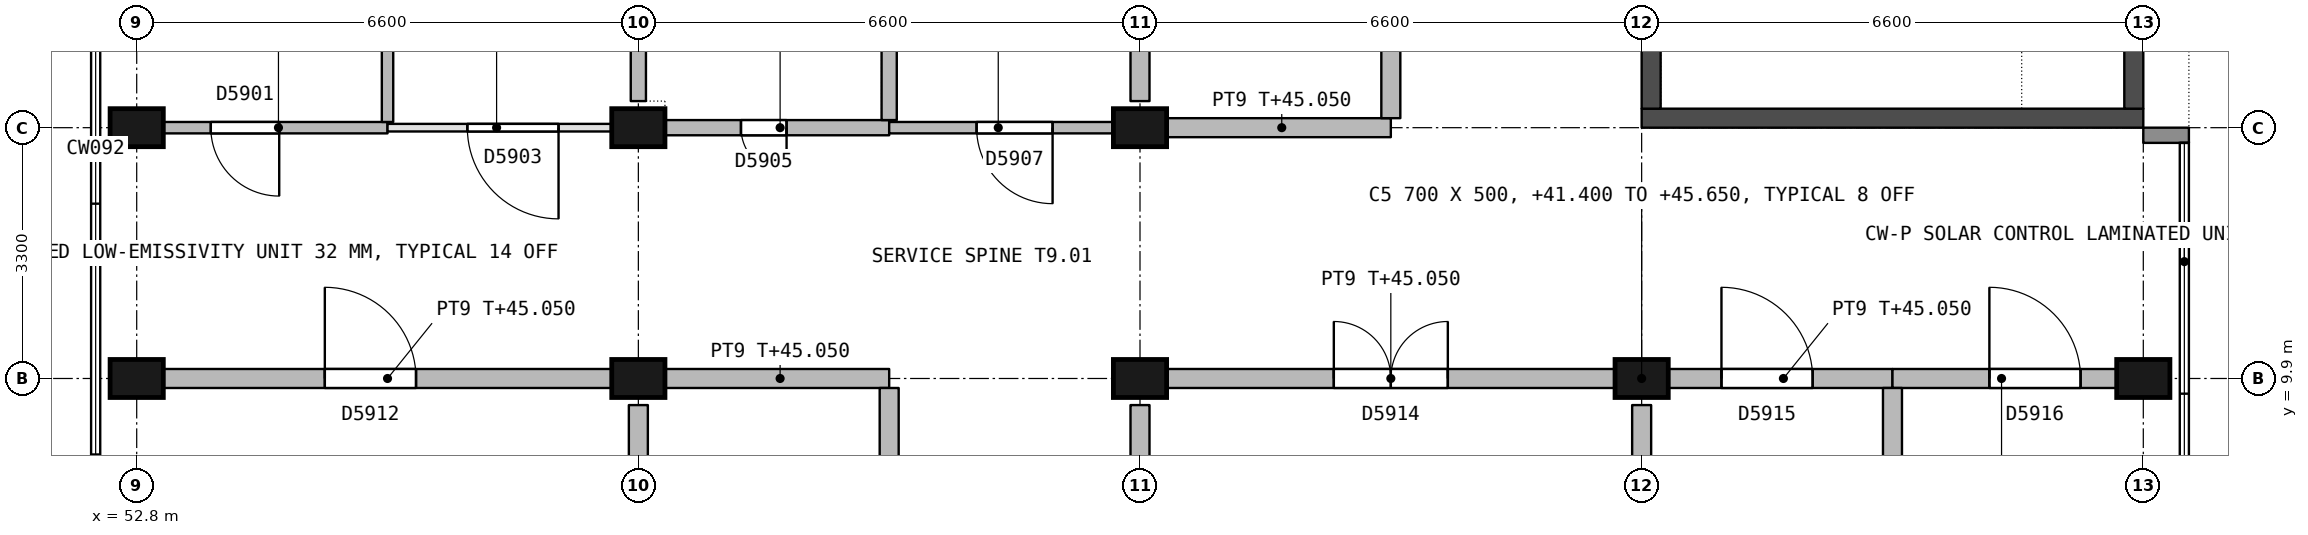
"""IFC4 building model, lengths in metres.
Left out: names, types, materials, properties, quantities, classifications, styles, units other than length and angle.
Written with IfcOpenShell. Run it as: python <this file> out.ifc"""

import sys

from ifc_helpers import new_model, si_unit, direction, frame, frame_2d, origin, origin_2d, place, context, subcontext, project, spatial, rectangle, extrude, element, fill, save


model = new_model("IFC4")
c1 = context("Model", 3, precision=1e-05, world=origin(), true_north=direction((0.0, 1.0)))
c2 = subcontext(c1, "Body", "Model", "MODEL_VIEW")
j1 = project(units=[si_unit("LENGTHUNIT", "METRE"), si_unit("PLANEANGLEUNIT", "RADIAN")], contexts=[c1])
p1 = place(None, origin())
s1 = spatial("IfcSite", under=j1, at=p1, CompositionType="ELEMENT")
p2 = place(p1, origin())
s2 = spatial("IfcBuilding", under=s1, at=p2, CompositionType="ELEMENT")
p3 = place(p2, frame((0.0, 0.0, 41.4)))
s3 = spatial("IfcBuildingStorey", under=s2, at=p3, CompositionType="ELEMENT", Elevation=41.4)
for number, where, z_axis, x_axis in (
    (1, (52.8, 9.9, 0.0), (0.0, 0.0, 1.0), (1.0, 0.0, 0.0)),
    (2, (52.8, 13.2, 0.0), (0.0, 0.0, 1.0), (1.0, 0.0, 0.0)),
    (3, (59.4, 9.9, 0.0), (0.0, 0.0, 1.0), (1.0, 0.0, 0.0)),
    (4, (59.4, 13.2, 0.0), (0.0, 0.0, 1.0), (1.0, 0.0, 0.0)),
    (5, (66.0, 9.9, 0.0), (0.0, 0.0, 1.0), (1.0, 0.0, 0.0)),
    (6, (66.0, 13.2, 0.0), (0.0, 0.0, 1.0), (1.0, 0.0, 0.0)),
    (7, (72.6, 9.9, 0.0), (0.0, 0.0, 1.0), (1.0, 0.0, 0.0)),
    (8, (79.2, 9.9, 0.0), (0.0, 0.0, 1.0), (1.0, 0.0, 0.0)),
):
    element("IfcColumn", number, at=place(p3, frame(where, z_axis=z_axis, x_axis=x_axis)), inside=s3, PredefinedType="COLUMN", context=c2, shape_type="SweptSolid", body=[
        extrude(rectangle(XDim=0.7, YDim=0.5, at=origin_2d()), origin(), (0.0, 0.0, 1.0), 4.25),
    ])
p4 = place(p3, frame((72.6, 13.325, 0.0), z_axis=(0.0, 0.0, 1.0), x_axis=(1.0, 0.0, 0.0)))
e9 = element("IfcWall", 9, at=p4, inside=s3, PredefinedType="SHEAR", context=c2, shape_type="SweptSolid", body=[
    extrude(rectangle(XDim=6.6, YDim=0.25, at=frame_2d((3.3, 0.0))), origin(), (0.0, 0.0, 1.0), 4.25),
])
p5 = place(p3, frame((72.725, 13.45, 0.0), z_axis=(0.0, 0.0, 1.0), x_axis=(0.0, 1.0, 0.0)))
e10 = element("IfcWall", 10, at=p5, inside=s3, PredefinedType="SHEAR", context=c2, shape_type="SweptSolid", body=[
    extrude(rectangle(XDim=9.4, YDim=0.25, at=frame_2d((4.7, 0.0))), origin(), (0.0, 0.0, 1.0), 4.25),
])
p6 = place(p5, frame((4.125, 0.0, 0.0)))
e11 = element("IfcOpeningElement", 11, at=p6, cuts=e10, PredefinedType="OPENING", context=c2, shape_type="SweptSolid", body=[
    extrude(rectangle(XDim=1.2, YDim=2.1, at=frame_2d((0.6, 1.05))), frame((0.0, 0.135, 0.0), z_axis=(0.0, -1.0, 0.0), x_axis=(1.0, 0.0, 0.0)), (0.0, 0.0, 1.0), 0.27),
])
p7 = place(p3, frame((79.075, 13.45, 0.0), z_axis=(0.0, 0.0, 1.0), x_axis=(0.0, 1.0, 0.0)))
e12 = element("IfcWall", 12, at=p7, inside=s3, PredefinedType="SHEAR", context=c2, shape_type="SweptSolid", body=[
    extrude(rectangle(XDim=9.4, YDim=0.25, at=frame_2d((4.7, 0.0))), origin(), (0.0, 0.0, 1.0), 4.25),
])
p8 = place(p7, frame((0.95, 0.0, 0.7)))
e13 = element("IfcOpeningElement", 13, at=p8, cuts=e12, PredefinedType="OPENING", context=c2, shape_type="SweptSolid", body=[
    extrude(rectangle(XDim=1.2, YDim=1.8, at=frame_2d((0.6, 0.9))), frame((0.0, 0.135, 0.0), z_axis=(0.0, -1.0, 0.0), x_axis=(1.0, 0.0, 0.0)), (0.0, 0.0, 1.0), 0.27),
])
p9 = place(p3, frame((79.2, 13.1, 0.0), z_axis=(0.0, 0.0, 1.0), x_axis=(1.0, 0.0, 0.0)))
e14 = element("IfcWall", 14, at=p9, inside=s3, PredefinedType="STANDARD", context=c2, shape_type="SweptSolid", body=[
    extrude(rectangle(XDim=0.6, YDim=0.2, at=frame_2d((0.3, 0.0))), origin(), (0.0, 0.0, 1.0), 3.65),
])
p10 = place(p3, frame((56.1, 13.2, 0.0), z_axis=(0.0, 0.0, 1.0), x_axis=(-1.0, 0.0, 0.0)))
e15 = element("IfcWall", 15, at=p10, inside=s3, PredefinedType="PARTITIONING", context=c2, shape_type="SweptSolid", body=[
    extrude(rectangle(XDim=2.95, YDim=0.15, at=frame_2d((1.475, 0.0))), origin(), (0.0, 0.0, 1.0), 3.65),
])
p11 = place(p10, frame((1.425, 0.0, 0.0)))
e16 = element("IfcOpeningElement", 16, at=p11, cuts=e15, PredefinedType="OPENING", context=c2, shape_type="SweptSolid", body=[
    extrude(rectangle(XDim=0.9, YDim=2.1, at=frame_2d((0.45, 1.05))), frame((0.0, 0.085, 0.0), z_axis=(0.0, -1.0, 0.0), x_axis=(1.0, 0.0, 0.0)), (0.0, 0.0, 1.0), 0.17),
])
p12 = place(p3, frame((56.1, 13.2, 0.0), z_axis=(0.0, 0.0, 1.0), x_axis=(1.0, 0.0, 0.0)))
e17 = element("IfcWall", 17, at=p12, inside=s3, PredefinedType="PARTITIONING", context=c2, shape_type="SweptSolid", body=[
    extrude(rectangle(XDim=2.95, YDim=0.1, at=frame_2d((1.475, 0.0))), origin(), (0.0, 0.0, 1.0), 3.65),
])
p13 = place(p12, frame((1.05, 0.0, 0.0)))
e18 = element("IfcOpeningElement", 18, at=p13, cuts=e17, PredefinedType="OPENING", context=c2, shape_type="SweptSolid", body=[
    extrude(rectangle(XDim=1.2, YDim=2.1, at=frame_2d((0.6, 1.05))), frame((0.0, 0.06, 0.0), z_axis=(0.0, -1.0, 0.0), x_axis=(1.0, 0.0, 0.0)), (0.0, 0.0, 1.0), 0.12),
])
p14 = place(p3, frame((59.75, 13.2, 0.0), z_axis=(0.0, 0.0, 1.0), x_axis=(1.0, 0.0, 0.0)))
e19 = element("IfcWall", 19, at=p14, inside=s3, PredefinedType="PARTITIONING", context=c2, shape_type="SweptSolid", body=[
    extrude(rectangle(XDim=2.95, YDim=0.2, at=frame_2d((1.475, 0.0))), origin(), (0.0, 0.0, 1.0), 3.65),
])
p15 = place(p14, frame((1.0, 0.0, 0.0)))
e20 = element("IfcOpeningElement", 20, at=p15, cuts=e19, PredefinedType="OPENING", context=c2, shape_type="SweptSolid", body=[
    extrude(rectangle(XDim=0.6, YDim=2.1, at=frame_2d((0.3, 1.05))), frame((0.0, 0.11, 0.0), z_axis=(0.0, -1.0, 0.0), x_axis=(1.0, 0.0, 0.0)), (0.0, 0.0, 1.0), 0.22),
])
p16 = place(p3, frame((62.7, 13.2, 0.0), z_axis=(0.0, 0.0, 1.0), x_axis=(1.0, 0.0, 0.0)))
e21 = element("IfcWall", 21, at=p16, inside=s3, PredefinedType="PARTITIONING", context=c2, shape_type="SweptSolid", body=[
    extrude(rectangle(XDim=2.95, YDim=0.15, at=frame_2d((1.475, 0.0))), origin(), (0.0, 0.0, 1.0), 3.65),
])
p17 = place(p16, frame((1.15, 0.0, 0.0)))
e22 = element("IfcOpeningElement", 22, at=p17, cuts=e21, PredefinedType="OPENING", context=c2, shape_type="SweptSolid", body=[
    extrude(rectangle(XDim=1.0, YDim=2.1, at=frame_2d((0.5, 1.05))), frame((0.0, 0.085, 0.0), z_axis=(0.0, -1.0, 0.0), x_axis=(1.0, 0.0, 0.0)), (0.0, 0.0, 1.0), 0.17),
])
p18 = place(p3, frame((69.3, 13.2, 0.0), z_axis=(0.0, 0.0, 1.0), x_axis=(-1.0, 0.0, 0.0)))
e23 = element("IfcWall", 23, at=p18, inside=s3, PredefinedType="PARTITIONING", context=c2, shape_type="SweptSolid", body=[
    extrude(rectangle(XDim=2.95, YDim=0.25, at=frame_2d((1.475, 0.0))), origin(), (0.0, 0.0, 1.0), 3.65),
])
p19 = place(p3, frame((53.15, 9.9, 0.0), z_axis=(0.0, 0.0, 1.0), x_axis=(1.0, 0.0, 0.0)))
e24 = element("IfcWall", 24, at=p19, inside=s3, PredefinedType="PARTITIONING", context=c2, shape_type="SweptSolid", body=[
    extrude(rectangle(XDim=5.9, YDim=0.25, at=frame_2d((2.95, 0.0))), origin(), (0.0, 0.0, 1.0), 3.65),
])
p20 = place(p19, frame((2.125, 0.0, 0.0)))
e25 = element("IfcOpeningElement", 25, at=p20, cuts=e24, PredefinedType="OPENING", context=c2, shape_type="SweptSolid", body=[
    extrude(rectangle(XDim=1.2, YDim=2.4, at=frame_2d((0.6, 1.2))), frame((0.0, 0.135, 0.0), z_axis=(0.0, -1.0, 0.0), x_axis=(1.0, 0.0, 0.0)), (0.0, 0.0, 1.0), 0.27),
])
p21 = place(p3, frame((59.75, 9.9, 0.0), z_axis=(0.0, 0.0, 1.0), x_axis=(1.0, 0.0, 0.0)))
e26 = element("IfcWall", 26, at=p21, inside=s3, PredefinedType="PARTITIONING", context=c2, shape_type="SweptSolid", body=[
    extrude(rectangle(XDim=2.95, YDim=0.25, at=frame_2d((1.475, 0.0))), origin(), (0.0, 0.0, 1.0), 3.65),
])
p22 = place(p3, frame((66.35, 9.9, 0.0), z_axis=(0.0, 0.0, 1.0), x_axis=(1.0, 0.0, 0.0)))
e27 = element("IfcWall", 27, at=p22, inside=s3, PredefinedType="PARTITIONING", context=c2, shape_type="SweptSolid", body=[
    extrude(rectangle(XDim=5.9, YDim=0.25, at=frame_2d((2.95, 0.0))), origin(), (0.0, 0.0, 1.0), 3.65),
])
p23 = place(p22, frame((2.2, 0.0, 0.0)))
e28 = element("IfcOpeningElement", 28, at=p23, cuts=e27, PredefinedType="OPENING", context=c2, shape_type="SweptSolid", body=[
    extrude(rectangle(XDim=1.5, YDim=2.4, at=frame_2d((0.75, 1.2))), frame((0.0, 0.135, 0.0), z_axis=(0.0, -1.0, 0.0), x_axis=(1.0, 0.0, 0.0)), (0.0, 0.0, 1.0), 0.27),
])
p24 = place(p3, frame((72.95, 9.9, 0.0), z_axis=(0.0, 0.0, 1.0), x_axis=(1.0, 0.0, 0.0)))
e29 = element("IfcWall", 29, at=p24, inside=s3, PredefinedType="PARTITIONING", context=c2, shape_type="SweptSolid", body=[
    extrude(rectangle(XDim=2.95, YDim=0.25, at=frame_2d((1.475, 0.0))), origin(), (0.0, 0.0, 1.0), 3.65),
])
p25 = place(p24, frame((0.7, 0.0, 0.0)))
e30 = element("IfcOpeningElement", 30, at=p25, cuts=e29, PredefinedType="OPENING", context=c2, shape_type="SweptSolid", body=[
    extrude(rectangle(XDim=1.2, YDim=2.1, at=frame_2d((0.6, 1.05))), frame((0.0, 0.135, 0.0), z_axis=(0.0, -1.0, 0.0), x_axis=(1.0, 0.0, 0.0)), (0.0, 0.0, 1.0), 0.27),
])
p26 = place(p3, frame((75.9, 9.9, 0.0), z_axis=(0.0, 0.0, 1.0), x_axis=(1.0, 0.0, 0.0)))
e31 = element("IfcWall", 31, at=p26, inside=s3, PredefinedType="PARTITIONING", context=c2, shape_type="SweptSolid", body=[
    extrude(rectangle(XDim=2.95, YDim=0.25, at=frame_2d((1.475, 0.0))), origin(), (0.0, 0.0, 1.0), 3.65),
])
p27 = place(p26, frame((1.275, 0.0, 0.0)))
e32 = element("IfcOpeningElement", 32, at=p27, cuts=e31, PredefinedType="OPENING", context=c2, shape_type="SweptSolid", body=[
    extrude(rectangle(XDim=1.2, YDim=2.4, at=frame_2d((0.6, 1.2))), frame((0.0, 0.135, 0.0), z_axis=(0.0, -1.0, 0.0), x_axis=(1.0, 0.0, 0.0)), (0.0, 0.0, 1.0), 0.27),
])
p28 = place(p3, frame((56.1, 13.275, 0.0), z_axis=(0.0, 0.0, 1.0), x_axis=(0.0, 1.0, 0.0)))
e33 = element("IfcWall", 33, at=p28, inside=s3, PredefinedType="PARTITIONING", context=c2, shape_type="SweptSolid", body=[
    extrude(rectangle(XDim=3.15, YDim=0.15, at=frame_2d((1.575, 0.0))), origin(), (0.0, 0.0, 1.0), 4.25),
])
p29 = place(p3, frame((59.4, 13.55, 0.0), z_axis=(0.0, 0.0, 1.0), x_axis=(0.0, 1.0, 0.0)))
e34 = element("IfcWall", 34, at=p29, inside=s3, PredefinedType="PARTITIONING", context=c2, shape_type="SweptSolid", body=[
    extrude(rectangle(XDim=2.95, YDim=0.2, at=frame_2d((1.475, 0.0))), origin(), (0.0, 0.0, 1.0), 3.45),
])
p30 = place(p3, frame((62.7, 13.3, 0.0), z_axis=(0.0, 0.0, 1.0), x_axis=(0.0, 1.0, 0.0)))
e35 = element("IfcWall", 35, at=p30, inside=s3, PredefinedType="PARTITIONING", context=c2, shape_type="SweptSolid", body=[
    extrude(rectangle(XDim=3.1, YDim=0.2, at=frame_2d((1.55, 0.0))), origin(), (0.0, 0.0, 1.0), 4.25),
])
p31 = place(p3, frame((66.0, 13.55, 0.0), z_axis=(0.0, 0.0, 1.0), x_axis=(0.0, 1.0, 0.0)))
e36 = element("IfcWall", 36, at=p31, inside=s3, PredefinedType="PARTITIONING", context=c2, shape_type="SweptSolid", body=[
    extrude(rectangle(XDim=9.2, YDim=0.25, at=frame_2d((4.6, 0.0))), origin(), (0.0, 0.0, 1.0), 3.45),
])
p32 = place(p3, frame((69.3, 23.55, 0.0), z_axis=(0.0, 0.0, 1.0), x_axis=(0.0, -1.0, 0.0)))
e37 = element("IfcWall", 37, at=p32, inside=s3, PredefinedType="PARTITIONING", context=c2, shape_type="SweptSolid", body=[
    extrude(rectangle(XDim=10.225, YDim=0.25, at=frame_2d((5.113, 0.0))), origin(), (0.0, 0.0, 1.0), 4.25),
])
p33 = place(p32, frame((4.575, 0.0, 0.0)))
e38 = element("IfcOpeningElement", 38, at=p33, cuts=e37, PredefinedType="OPENING", context=c2, shape_type="SweptSolid", body=[
    extrude(rectangle(XDim=1.2, YDim=2.4, at=frame_2d((0.6, 1.2))), frame((0.0, 0.135, 0.0), z_axis=(0.0, -1.0, 0.0), x_axis=(1.0, 0.0, 0.0)), (0.0, 0.0, 1.0), 0.27),
])
p34 = place(p3, frame((59.4, 4.025, 0.0), z_axis=(0.0, 0.0, 1.0), x_axis=(0.0, 1.0, 0.0)))
e39 = element("IfcWall", 39, at=p34, inside=s3, PredefinedType="PARTITIONING", context=c2, shape_type="SweptSolid", body=[
    extrude(rectangle(XDim=5.525, YDim=0.25, at=frame_2d((2.763, 0.0))), origin(), (0.0, 0.0, 1.0), 3.45),
])
p35 = place(p3, frame((62.7, 9.775, 0.0), z_axis=(0.0, 0.0, 1.0), x_axis=(0.0, -1.0, 0.0)))
e40 = element("IfcWall", 40, at=p35, inside=s3, PredefinedType="PARTITIONING", context=c2, shape_type="SweptSolid", body=[
    extrude(rectangle(XDim=5.75, YDim=0.25, at=frame_2d((2.875, 0.0))), origin(), (0.0, 0.0, 1.0), 4.25),
])
p36 = place(p35, frame((2.125, 0.0, 0.0)))
e41 = element("IfcOpeningElement", 41, at=p36, cuts=e40, PredefinedType="OPENING", context=c2, shape_type="SweptSolid", body=[
    extrude(rectangle(XDim=1.5, YDim=2.4, at=frame_2d((0.75, 1.2))), frame((0.0, 0.135, 0.0), z_axis=(0.0, -1.0, 0.0), x_axis=(1.0, 0.0, 0.0)), (0.0, 0.0, 1.0), 0.27),
])
for number, where, z_axis, x_axis in (
    (42, (66.0, 4.025, 0.0), (0.0, 0.0, 1.0), (0.0, 1.0, 0.0)),
    (43, (72.6, 4.025, 0.0), (0.0, 0.0, 1.0), (0.0, 1.0, 0.0)),
):
    element("IfcWall", number, at=place(p3, frame(where, z_axis=z_axis, x_axis=x_axis)), inside=s3, PredefinedType="PARTITIONING", context=c2, shape_type="SweptSolid", body=[
        extrude(rectangle(XDim=5.525, YDim=0.25, at=frame_2d((2.763, 0.0))), origin(), (0.0, 0.0, 1.0), 3.45),
    ])
p37 = place(p3, frame((75.9, 4.025, 0.0), z_axis=(0.0, 0.0, 1.0), x_axis=(0.0, 1.0, 0.0)))
e44 = element("IfcWall", 44, at=p37, inside=s3, PredefinedType="PARTITIONING", context=c2, shape_type="SweptSolid", body=[
    extrude(rectangle(XDim=5.75, YDim=0.25, at=frame_2d((2.875, 0.0))), origin(), (0.0, 0.0, 1.0), 4.25),
])
p38 = place(p11, origin())
e45 = element("IfcDoor", 45, at=p38, inside=s3, OperationType="SINGLE_SWING_LEFT", PredefinedType="DOOR", context=c2, shape_type="SweptSolid", body=[
    extrude(rectangle(XDim=0.9, YDim=2.1, at=frame_2d((0.45, 1.05))), frame((0.0, 0.027, 0.0), z_axis=(0.0, -1.0, 0.0), x_axis=(1.0, 0.0, 0.0)), (0.0, 0.0, 1.0), 0.054),
])
fill(e16, e45)
p39 = place(p13, origin())
e46 = element("IfcDoor", 46, at=p39, inside=s3, OperationType="SINGLE_SWING_RIGHT", PredefinedType="DOOR", context=c2, shape_type="SweptSolid", body=[
    extrude(rectangle(XDim=1.2, YDim=2.1, at=frame_2d((0.6, 1.05))), frame((0.0, 0.022, 0.0), z_axis=(0.0, -1.0, 0.0), x_axis=(1.0, 0.0, 0.0)), (0.0, 0.0, 1.0), 0.044),
])
fill(e18, e46)
p40 = place(p15, origin())
e47 = element("IfcDoor", 47, at=p40, inside=s3, OperationType="SINGLE_SWING_RIGHT", PredefinedType="DOOR", context=c2, shape_type="SweptSolid", body=[
    extrude(rectangle(XDim=0.6, YDim=2.1, at=frame_2d((0.3, 1.05))), frame((0.0, 0.03, 0.0), z_axis=(0.0, -1.0, 0.0), x_axis=(1.0, 0.0, 0.0)), (0.0, 0.0, 1.0), 0.06),
])
fill(e20, e47)
p41 = place(p17, origin())
e48 = element("IfcDoor", 48, at=p41, inside=s3, OperationType="SINGLE_SWING_RIGHT", PredefinedType="DOOR", context=c2, shape_type="SweptSolid", body=[
    extrude(rectangle(XDim=1.0, YDim=2.1, at=frame_2d((0.5, 1.05))), frame((0.0, 0.027, 0.0), z_axis=(0.0, -1.0, 0.0), x_axis=(1.0, 0.0, 0.0)), (0.0, 0.0, 1.0), 0.054),
])
fill(e22, e48)
p42 = place(p20, origin())
e49 = element("IfcDoor", 49, at=p42, inside=s3, OperationType="SINGLE_SWING_LEFT", PredefinedType="DOOR", context=c2, shape_type="SweptSolid", body=[
    extrude(rectangle(XDim=1.2, YDim=2.4, at=frame_2d((0.6, 1.2))), frame((0.0, 0.03, 0.0), z_axis=(0.0, -1.0, 0.0), x_axis=(1.0, 0.0, 0.0)), (0.0, 0.0, 1.0), 0.06),
])
fill(e25, e49)
p43 = place(p23, origin())
e50 = element("IfcDoor", 50, at=p43, inside=s3, OperationType="DOUBLE_DOOR_SINGLE_SWING", PredefinedType="DOOR", context=c2, shape_type="SweptSolid", body=[
    extrude(rectangle(XDim=1.5, YDim=2.4, at=frame_2d((0.75, 1.2))), frame((0.0, 0.03, 0.0), z_axis=(0.0, -1.0, 0.0), x_axis=(1.0, 0.0, 0.0)), (0.0, 0.0, 1.0), 0.06),
])
fill(e28, e50)
p44 = place(p25, origin())
e51 = element("IfcDoor", 51, at=p44, inside=s3, OperationType="SINGLE_SWING_LEFT", PredefinedType="DOOR", context=c2, shape_type="SweptSolid", body=[
    extrude(rectangle(XDim=1.2, YDim=2.1, at=frame_2d((0.6, 1.05))), frame((0.0, 0.03, 0.0), z_axis=(0.0, -1.0, 0.0), x_axis=(1.0, 0.0, 0.0)), (0.0, 0.0, 1.0), 0.06),
])
fill(e30, e51)
p45 = place(p27, origin())
e52 = element("IfcDoor", 52, at=p45, inside=s3, OperationType="SINGLE_SWING_LEFT", PredefinedType="DOOR", context=c2, shape_type="SweptSolid", body=[
    extrude(rectangle(XDim=1.2, YDim=2.4, at=frame_2d((0.6, 1.2))), frame((0.0, 0.03, 0.0), z_axis=(0.0, -1.0, 0.0), x_axis=(1.0, 0.0, 0.0)), (0.0, 0.0, 1.0), 0.06),
])
fill(e32, e52)
save(model, sys.argv[1])
